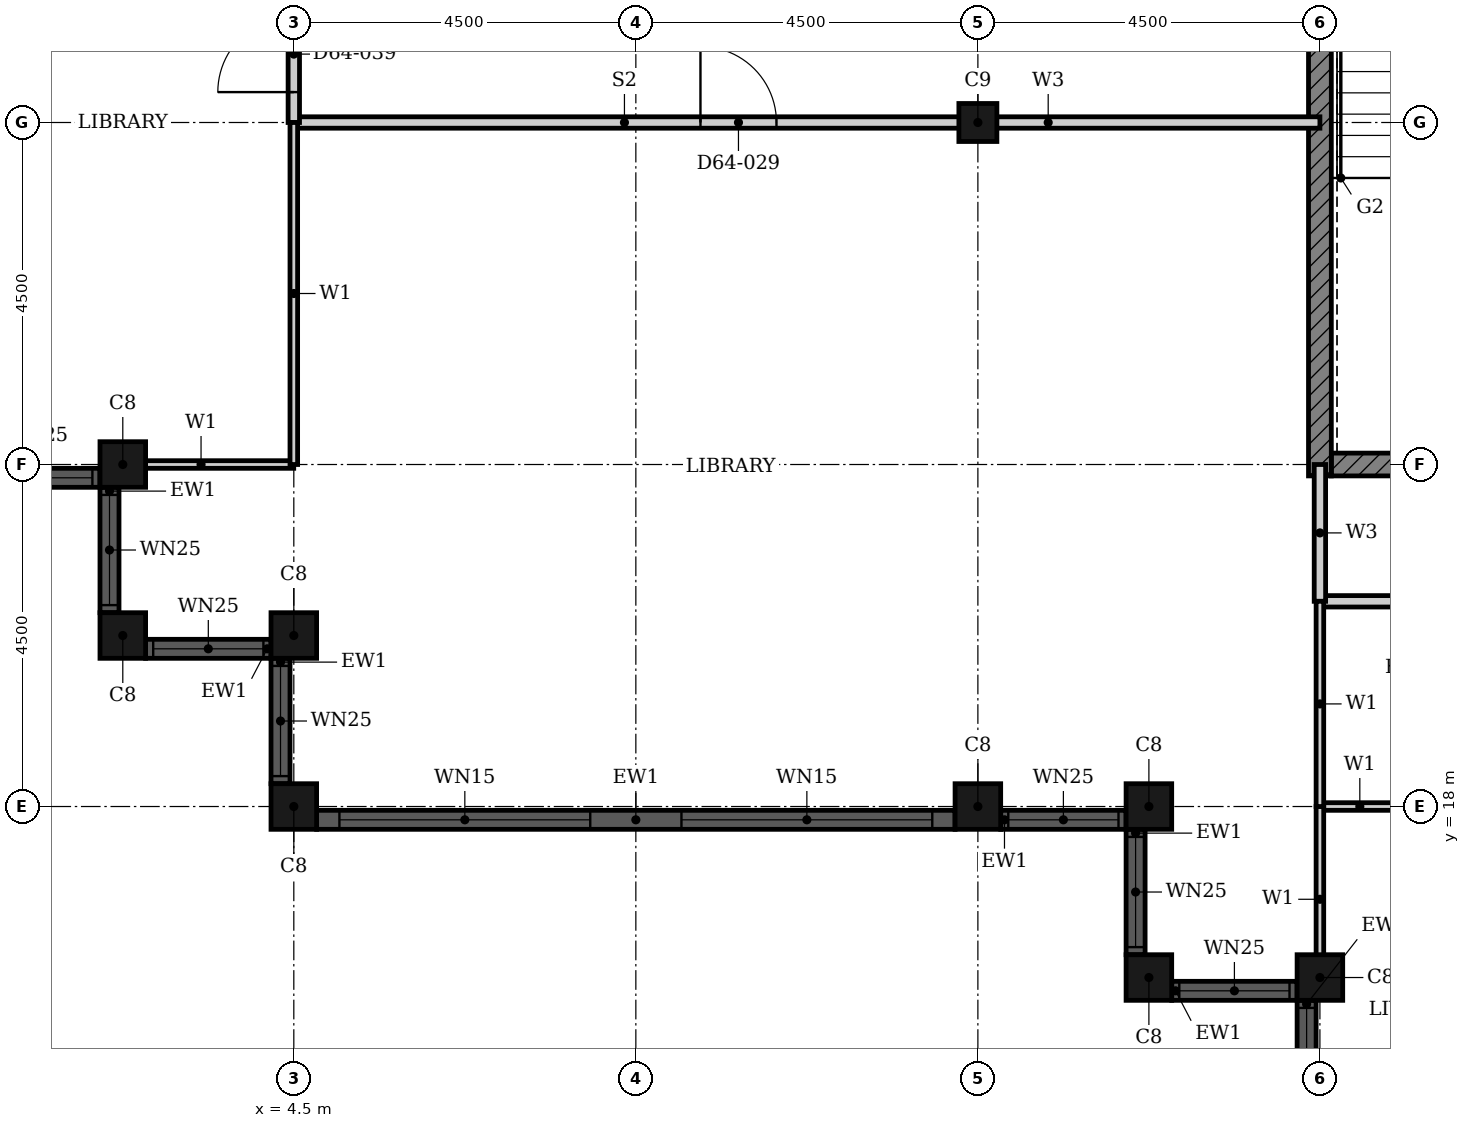
"""IFC4 building model, lengths in metres.
Left out: names, types, materials, properties, quantities, classifications, styles, units other than length and angle.
Written with IfcOpenShell. Run it as: python <this file> out.ifc"""

import sys

from ifc_helpers import new_model, si_unit, direction, frame, frame_2d, origin, origin_2d, place, context, subcontext, project, spatial, rectangle, hollow_rectangle, extrude, element, fill, save


model = new_model("IFC4")
c1 = context("Model", 3, precision=1e-05, world=origin(), true_north=direction((0.0, 1.0)))
c2 = subcontext(c1, "Body", "Model", "MODEL_VIEW")
j1 = project(units=[si_unit("LENGTHUNIT", "METRE"), si_unit("PLANEANGLEUNIT", "RADIAN")], contexts=[c1])
p1 = place(None, origin())
s1 = spatial("IfcSite", under=j1, at=p1, CompositionType="ELEMENT")
p2 = place(p1, origin())
s2 = spatial("IfcBuilding", under=s1, at=p2, CompositionType="ELEMENT")
p3 = place(p2, frame((0.0, 0.0, 252.7)))
s3 = spatial("IfcBuildingStorey", under=s2, at=p3, CompositionType="ELEMENT", Elevation=252.7)
for number, where, z_axis, x_axis in (
    (1, (15.75, 18.0, 0.0), (0.0, 0.0, 1.0), (1.0, 0.0, 0.0)),
    (2, (15.75, 15.75, 0.0), (0.0, 0.0, 1.0), (1.0, 0.0, 0.0)),
    (3, (18.0, 15.75, 0.0), (0.0, 0.0, 1.0), (1.0, 0.0, 0.0)),
    (4, (2.25, 22.5, 0.0), (0.0, 0.0, 1.0), (1.0, 0.0, 0.0)),
    (5, (2.25, 20.25, 0.0), (0.0, 0.0, 1.0), (1.0, 0.0, 0.0)),
    (6, (4.5, 20.25, 0.0), (0.0, 0.0, 1.0), (1.0, 0.0, 0.0)),
    (7, (4.5, 18.0, 0.0), (0.0, 0.0, 1.0), (1.0, 0.0, 0.0)),
    (8, (13.5, 18.0, 0.0), (0.0, 0.0, 1.0), (1.0, 0.0, 0.0)),
):
    element("IfcColumn", number, at=place(p3, frame(where, z_axis=z_axis, x_axis=x_axis)), inside=s3, PredefinedType="COLUMN", context=c2, shape_type="SweptSolid", body=[
        extrude(hollow_rectangle(XDim=0.6, YDim=0.6, WallThickness=0.02, at=origin_2d()), origin(), (0.0, 0.0, 1.0), 3.7),
    ])
p4 = place(p3, frame((13.5, 27.0, 0.0), z_axis=(0.0, 0.0, 1.0), x_axis=(1.0, 0.0, 0.0)))
e9 = element("IfcColumn", 9, at=p4, inside=s3, PredefinedType="COLUMN", context=c2, shape_type="SweptSolid", body=[
    extrude(hollow_rectangle(XDim=0.5, YDim=0.5, WallThickness=0.016, InnerFilletRadius=0.032, OuterFilletRadius=0.048, at=origin_2d()), origin(), (0.0, 0.0, 1.0), 3.7),
])
p5 = place(p3, frame((15.575, 17.7, 0.0), z_axis=(0.0, 0.0, 1.0), x_axis=(0.0, -1.0, 0.0)))
e10 = element("IfcWall", 10, at=p5, inside=s3, PredefinedType="SOLIDWALL", context=c2, shape_type="SweptSolid", body=[
    extrude(rectangle(XDim=1.65, YDim=0.25, at=frame_2d((0.825, 0.0))), origin(), (0.0, 0.0, 1.0), 3.7),
])
p6 = place(p5, frame((0.1, 0.0, 0.9)))
e11 = element("IfcOpeningElement", 11, at=p6, cuts=e10, PredefinedType="OPENING", context=c2, shape_type="SweptSolid", body=[
    extrude(rectangle(XDim=1.45, YDim=1.85, at=frame_2d((0.725, 0.925))), frame((0.0, 0.135, 0.0), z_axis=(0.0, -1.0, 0.0), x_axis=(1.0, 0.0, 0.0)), (0.0, 0.0, 1.0), 0.27),
])
p7 = place(p3, frame((16.05, 15.575, 0.0), z_axis=(0.0, 0.0, 1.0), x_axis=(1.0, 0.0, 0.0)))
e12 = element("IfcWall", 12, at=p7, inside=s3, PredefinedType="SOLIDWALL", context=c2, shape_type="SweptSolid", body=[
    extrude(rectangle(XDim=1.65, YDim=0.25, at=frame_2d((0.825, 0.0))), origin(), (0.0, 0.0, 1.0), 3.7),
])
p8 = place(p7, frame((0.1, 0.0, 0.9)))
e13 = element("IfcOpeningElement", 13, at=p8, cuts=e12, PredefinedType="OPENING", context=c2, shape_type="SweptSolid", body=[
    extrude(rectangle(XDim=1.45, YDim=1.85, at=frame_2d((0.725, 0.925))), frame((0.0, 0.135, 0.0), z_axis=(0.0, -1.0, 0.0), x_axis=(1.0, 0.0, 0.0)), (0.0, 0.0, 1.0), 0.27),
])
p9 = place(p3, frame((17.825, 15.45, 0.0), z_axis=(0.0, 0.0, 1.0), x_axis=(0.0, -1.0, 0.0)))
e14 = element("IfcWall", 14, at=p9, inside=s3, PredefinedType="SOLIDWALL", context=c2, shape_type="SweptSolid", body=[
    extrude(rectangle(XDim=1.65, YDim=0.25, at=frame_2d((0.825, 0.0))), origin(), (0.0, 0.0, 1.0), 3.7),
])
p10 = place(p9, frame((0.1, 0.0, 0.9)))
e15 = element("IfcOpeningElement", 15, at=p10, cuts=e14, PredefinedType="OPENING", context=c2, shape_type="SweptSolid", body=[
    extrude(rectangle(XDim=1.45, YDim=1.85, at=frame_2d((0.725, 0.925))), frame((0.0, 0.135, 0.0), z_axis=(0.0, -1.0, 0.0), x_axis=(1.0, 0.0, 0.0)), (0.0, 0.0, 1.0), 0.27),
])
p11 = place(p3, frame((0.3, 22.325, 0.0), z_axis=(0.0, 0.0, 1.0), x_axis=(1.0, 0.0, 0.0)))
e16 = element("IfcWall", 16, at=p11, inside=s3, PredefinedType="SOLIDWALL", context=c2, shape_type="SweptSolid", body=[
    extrude(rectangle(XDim=1.65, YDim=0.25, at=frame_2d((0.825, 0.0))), origin(), (0.0, 0.0, 1.0), 3.7),
])
p12 = place(p11, frame((0.1, 0.0, 0.9)))
e17 = element("IfcOpeningElement", 17, at=p12, cuts=e16, PredefinedType="OPENING", context=c2, shape_type="SweptSolid", body=[
    extrude(rectangle(XDim=1.45, YDim=1.85, at=frame_2d((0.725, 0.925))), frame((0.0, 0.135, 0.0), z_axis=(0.0, -1.0, 0.0), x_axis=(1.0, 0.0, 0.0)), (0.0, 0.0, 1.0), 0.27),
])
p13 = place(p3, frame((2.075, 22.2, 0.0), z_axis=(0.0, 0.0, 1.0), x_axis=(0.0, -1.0, 0.0)))
e18 = element("IfcWall", 18, at=p13, inside=s3, PredefinedType="SOLIDWALL", context=c2, shape_type="SweptSolid", body=[
    extrude(rectangle(XDim=1.65, YDim=0.25, at=frame_2d((0.825, 0.0))), origin(), (0.0, 0.0, 1.0), 3.7),
])
p14 = place(p13, frame((0.1, 0.0, 0.9)))
e19 = element("IfcOpeningElement", 19, at=p14, cuts=e18, PredefinedType="OPENING", context=c2, shape_type="SweptSolid", body=[
    extrude(rectangle(XDim=1.45, YDim=1.85, at=frame_2d((0.725, 0.925))), frame((0.0, 0.135, 0.0), z_axis=(0.0, -1.0, 0.0), x_axis=(1.0, 0.0, 0.0)), (0.0, 0.0, 1.0), 0.27),
])
p15 = place(p3, frame((2.55, 20.075, 0.0), z_axis=(0.0, 0.0, 1.0), x_axis=(1.0, 0.0, 0.0)))
e20 = element("IfcWall", 20, at=p15, inside=s3, PredefinedType="SOLIDWALL", context=c2, shape_type="SweptSolid", body=[
    extrude(rectangle(XDim=1.65, YDim=0.25, at=frame_2d((0.825, 0.0))), origin(), (0.0, 0.0, 1.0), 3.7),
])
p16 = place(p15, frame((0.1, 0.0, 0.9)))
e21 = element("IfcOpeningElement", 21, at=p16, cuts=e20, PredefinedType="OPENING", context=c2, shape_type="SweptSolid", body=[
    extrude(rectangle(XDim=1.45, YDim=1.85, at=frame_2d((0.725, 0.925))), frame((0.0, 0.135, 0.0), z_axis=(0.0, -1.0, 0.0), x_axis=(1.0, 0.0, 0.0)), (0.0, 0.0, 1.0), 0.27),
])
p17 = place(p3, frame((4.325, 19.95, 0.0), z_axis=(0.0, 0.0, 1.0), x_axis=(0.0, -1.0, 0.0)))
e22 = element("IfcWall", 22, at=p17, inside=s3, PredefinedType="SOLIDWALL", context=c2, shape_type="SweptSolid", body=[
    extrude(rectangle(XDim=1.65, YDim=0.25, at=frame_2d((0.825, 0.0))), origin(), (0.0, 0.0, 1.0), 3.7),
])
p18 = place(p17, frame((0.1, 0.0, 0.9)))
e23 = element("IfcOpeningElement", 23, at=p18, cuts=e22, PredefinedType="OPENING", context=c2, shape_type="SweptSolid", body=[
    extrude(rectangle(XDim=1.45, YDim=1.85, at=frame_2d((0.725, 0.925))), frame((0.0, 0.135, 0.0), z_axis=(0.0, -1.0, 0.0), x_axis=(1.0, 0.0, 0.0)), (0.0, 0.0, 1.0), 0.27),
])
p19 = place(p3, frame((4.8, 17.825, 0.0), z_axis=(0.0, 0.0, 1.0), x_axis=(1.0, 0.0, 0.0)))
e24 = element("IfcWall", 24, at=p19, inside=s3, PredefinedType="SOLIDWALL", context=c2, shape_type="SweptSolid", body=[
    extrude(rectangle(XDim=8.4, YDim=0.25, at=frame_2d((4.2, 0.0))), origin(), (0.0, 0.0, 1.0), 3.7),
])
p20 = place(p19, frame((0.3, 0.0, 0.45)))
e25 = element("IfcOpeningElement", 25, at=p20, cuts=e24, PredefinedType="OPENING", context=c2, shape_type="SweptSolid", body=[
    extrude(rectangle(XDim=3.3, YDim=2.3, at=frame_2d((1.65, 1.15))), frame((0.0, 0.135, 0.0), z_axis=(0.0, -1.0, 0.0), x_axis=(1.0, 0.0, 0.0)), (0.0, 0.0, 1.0), 0.27),
])
p21 = place(p19, frame((4.8, 0.0, 0.45)))
e26 = element("IfcOpeningElement", 26, at=p21, cuts=e24, PredefinedType="OPENING", context=c2, shape_type="SweptSolid", body=[
    extrude(rectangle(XDim=3.3, YDim=2.3, at=frame_2d((1.65, 1.15))), frame((0.0, 0.135, 0.0), z_axis=(0.0, -1.0, 0.0), x_axis=(1.0, 0.0, 0.0)), (0.0, 0.0, 1.0), 0.27),
])
p22 = place(p3, frame((13.8, 17.825, 0.0), z_axis=(0.0, 0.0, 1.0), x_axis=(1.0, 0.0, 0.0)))
e27 = element("IfcWall", 27, at=p22, inside=s3, PredefinedType="SOLIDWALL", context=c2, shape_type="SweptSolid", body=[
    extrude(rectangle(XDim=1.65, YDim=0.25, at=frame_2d((0.825, 0.0))), origin(), (0.0, 0.0, 1.0), 3.7),
])
p23 = place(p22, frame((0.1, 0.0, 0.9)))
e28 = element("IfcOpeningElement", 28, at=p23, cuts=e27, PredefinedType="OPENING", context=c2, shape_type="SweptSolid", body=[
    extrude(rectangle(XDim=1.45, YDim=1.85, at=frame_2d((0.725, 0.925))), frame((0.0, 0.135, 0.0), z_axis=(0.0, -1.0, 0.0), x_axis=(1.0, 0.0, 0.0)), (0.0, 0.0, 1.0), 0.27),
])
p24 = place(p3, frame((18.15, 22.5, 0.0), z_axis=(0.0, 0.0, 1.0), x_axis=(1.0, 0.0, 0.0)))
e29 = element("IfcWall", 29, at=p24, inside=s3, PredefinedType="SHEAR", context=c2, shape_type="SweptSolid", body=[
    extrude(rectangle(XDim=4.225, YDim=0.3, at=frame_2d((2.113, 0.0))), origin(), (0.0, 0.0, 1.0), 3.4),
])
p25 = place(p3, frame((18.0, 22.35, 0.0), z_axis=(0.0, 0.0, 1.0), x_axis=(0.0, 1.0, 0.0)))
e30 = element("IfcWall", 30, at=p25, inside=s3, PredefinedType="SHEAR", context=c2, shape_type="SweptSolid", body=[
    extrude(rectangle(XDim=9.3, YDim=0.3, at=frame_2d((4.65, 0.0))), origin(), (0.0, 0.0, 1.0), 3.4),
])
p26 = place(p3, frame((18.0, 20.7, 0.0), z_axis=(0.0, 0.0, 1.0), x_axis=(1.0, 0.0, 0.0)))
e31 = element("IfcWall", 31, at=p26, inside=s3, PredefinedType="PARTITIONING", context=c2, shape_type="SweptSolid", body=[
    extrude(rectangle(XDim=6.6, YDim=0.15, at=frame_2d((3.3, 0.0))), origin(), (0.0, 0.0, 1.0), 3.4),
])
p27 = place(p26, frame((4.3, 0.0, 0.0)))
e32 = element("IfcOpeningElement", 32, at=p27, cuts=e31, PredefinedType="OPENING", context=c2, shape_type="SweptSolid", body=[
    extrude(rectangle(XDim=1.0, YDim=2.2, at=frame_2d((0.5, 1.1))), frame((0.0, 0.085, 0.0), z_axis=(0.0, -1.0, 0.0), x_axis=(1.0, 0.0, 0.0)), (0.0, 0.0, 1.0), 0.17),
])
p28 = place(p3, frame((4.5, 27.0, 0.0), z_axis=(0.0, 0.0, 1.0), x_axis=(1.0, 0.0, 0.0)))
e33 = element("IfcWall", 33, at=p28, inside=s3, PredefinedType="PARTITIONING", context=c2, shape_type="SweptSolid", body=[
    extrude(rectangle(XDim=13.5, YDim=0.15, at=frame_2d((6.75, 0.0))), origin(), (0.0, 0.0, 1.0), 2.68),
])
p29 = place(p28, frame((5.35, 0.0, 0.0)))
e34 = element("IfcOpeningElement", 34, at=p29, cuts=e33, PredefinedType="OPENING", context=c2, shape_type="SweptSolid", body=[
    extrude(rectangle(XDim=1.0, YDim=2.1, at=frame_2d((0.5, 1.05))), frame((0.0, 0.085, 0.0), z_axis=(0.0, -1.0, 0.0), x_axis=(1.0, 0.0, 0.0)), (0.0, 0.0, 1.0), 0.17),
])
p30 = place(p3, frame((18.0, 20.7, 0.0), z_axis=(0.0, 0.0, 1.0), x_axis=(0.0, 1.0, 0.0)))
e35 = element("IfcWall", 35, at=p30, inside=s3, PredefinedType="PARTITIONING", context=c2, shape_type="SweptSolid", body=[
    extrude(rectangle(XDim=1.8, YDim=0.15, at=frame_2d((0.9, 0.0))), origin(), (0.0, 0.0, 1.0), 3.4),
])
p31 = place(p3, frame((4.5, 27.0, 0.0), z_axis=(0.0, 0.0, 1.0), x_axis=(0.0, 1.0, 0.0)))
e36 = element("IfcWall", 36, at=p31, inside=s3, PredefinedType="PARTITIONING", context=c2, shape_type="SweptSolid", body=[
    extrude(rectangle(XDim=1.8, YDim=0.15, at=frame_2d((0.9, 0.0))), origin(), (0.0, 0.0, 1.0), 3.4),
])
p32 = place(p31, frame((0.4, 0.0, 0.0)))
e37 = element("IfcOpeningElement", 37, at=p32, cuts=e36, PredefinedType="OPENING", context=c2, shape_type="SweptSolid", body=[
    extrude(rectangle(XDim=1.0, YDim=2.1, at=frame_2d((0.5, 1.05))), frame((0.0, 0.085, 0.0), z_axis=(0.0, -1.0, 0.0), x_axis=(1.0, 0.0, 0.0)), (0.0, 0.0, 1.0), 0.17),
])
p33 = place(p3, frame((18.0, 18.0, 0.0), z_axis=(0.0, 0.0, 1.0), x_axis=(1.0, 0.0, 0.0)))
e38 = element("IfcWall", 38, at=p33, inside=s3, PredefinedType="PARTITIONING", context=c2, shape_type="SweptSolid", body=[
    extrude(rectangle(XDim=3.0, YDim=0.1, at=frame_2d((1.5, 0.0))), origin(), (0.0, 0.0, 1.0), 3.4),
])
p34 = place(p33, frame((1.05, 0.0, 0.0)))
e39 = element("IfcOpeningElement", 39, at=p34, cuts=e38, PredefinedType="OPENING", context=c2, shape_type="SweptSolid", body=[
    extrude(rectangle(XDim=0.9, YDim=2.1, at=frame_2d((0.45, 1.05))), frame((0.0, 0.06, 0.0), z_axis=(0.0, -1.0, 0.0), x_axis=(1.0, 0.0, 0.0)), (0.0, 0.0, 1.0), 0.12),
])
p35 = place(p3, frame((2.06, 22.5, 0.0), z_axis=(0.0, 0.0, 1.0), x_axis=(1.0, 0.0, 0.0)))
e40 = element("IfcWall", 40, at=p35, inside=s3, PredefinedType="PARTITIONING", context=c2, shape_type="SweptSolid", body=[
    extrude(rectangle(XDim=2.439, YDim=0.1, at=frame_2d((1.219, 0.0))), origin(), (0.0, 0.0, 1.0), 2.68),
])
p36 = place(p3, frame((18.0, 15.56, 0.0), z_axis=(0.0, 0.0, 1.0), x_axis=(0.0, 1.0, 0.0)))
e41 = element("IfcWall", 41, at=p36, inside=s3, PredefinedType="PARTITIONING", context=c2, shape_type="SweptSolid", body=[
    extrude(rectangle(XDim=2.439, YDim=0.1, at=frame_2d((1.219, 0.0))), origin(), (0.0, 0.0, 1.0), 3.4),
])
p37 = place(p3, frame((18.0, 18.0, 0.0), z_axis=(0.0, 0.0, 1.0), x_axis=(0.0, 1.0, 0.0)))
e42 = element("IfcWall", 42, at=p37, inside=s3, PredefinedType="PARTITIONING", context=c2, shape_type="SweptSolid", body=[
    extrude(rectangle(XDim=2.7, YDim=0.1, at=frame_2d((1.35, 0.0))), origin(), (0.0, 0.0, 1.0), 3.4),
])
p38 = place(p3, frame((4.5, 22.5, 0.0), z_axis=(0.0, 0.0, 1.0), x_axis=(0.0, 1.0, 0.0)))
e43 = element("IfcWall", 43, at=p38, inside=s3, PredefinedType="PARTITIONING", context=c2, shape_type="SweptSolid", body=[
    extrude(rectangle(XDim=4.5, YDim=0.1, at=frame_2d((2.25, 0.0))), origin(), (0.0, 0.0, 1.0), 3.4),
])
p39 = place(p6, origin())
e44 = element("IfcWindow", 44, at=p39, inside=s3, PartitioningType="SINGLE_PANEL", PredefinedType="WINDOW", context=c2, shape_type="SweptSolid", body=[
    extrude(rectangle(XDim=1.45, YDim=1.85, at=frame_2d((0.725, 0.925))), frame((0.0, 0.03, 0.0), z_axis=(0.0, -1.0, 0.0), x_axis=(1.0, 0.0, 0.0)), (0.0, 0.0, 1.0), 0.06),
])
fill(e11, e44)
p40 = place(p8, origin())
e45 = element("IfcWindow", 45, at=p40, inside=s3, PartitioningType="SINGLE_PANEL", PredefinedType="WINDOW", context=c2, shape_type="SweptSolid", body=[
    extrude(rectangle(XDim=1.45, YDim=1.85, at=frame_2d((0.725, 0.925))), frame((0.0, 0.03, 0.0), z_axis=(0.0, -1.0, 0.0), x_axis=(1.0, 0.0, 0.0)), (0.0, 0.0, 1.0), 0.06),
])
fill(e13, e45)
p41 = place(p10, origin())
e46 = element("IfcWindow", 46, at=p41, inside=s3, PartitioningType="SINGLE_PANEL", PredefinedType="WINDOW", context=c2, shape_type="SweptSolid", body=[
    extrude(rectangle(XDim=1.45, YDim=1.85, at=frame_2d((0.725, 0.925))), frame((0.0, 0.03, 0.0), z_axis=(0.0, -1.0, 0.0), x_axis=(1.0, 0.0, 0.0)), (0.0, 0.0, 1.0), 0.06),
])
fill(e15, e46)
p42 = place(p12, origin())
e47 = element("IfcWindow", 47, at=p42, inside=s3, PartitioningType="SINGLE_PANEL", PredefinedType="WINDOW", context=c2, shape_type="SweptSolid", body=[
    extrude(rectangle(XDim=1.45, YDim=1.85, at=frame_2d((0.725, 0.925))), frame((0.0, 0.03, 0.0), z_axis=(0.0, -1.0, 0.0), x_axis=(1.0, 0.0, 0.0)), (0.0, 0.0, 1.0), 0.06),
])
fill(e17, e47)
p43 = place(p14, origin())
e48 = element("IfcWindow", 48, at=p43, inside=s3, PartitioningType="SINGLE_PANEL", PredefinedType="WINDOW", context=c2, shape_type="SweptSolid", body=[
    extrude(rectangle(XDim=1.45, YDim=1.85, at=frame_2d((0.725, 0.925))), frame((0.0, 0.03, 0.0), z_axis=(0.0, -1.0, 0.0), x_axis=(1.0, 0.0, 0.0)), (0.0, 0.0, 1.0), 0.06),
])
fill(e19, e48)
p44 = place(p16, origin())
e49 = element("IfcWindow", 49, at=p44, inside=s3, PartitioningType="SINGLE_PANEL", PredefinedType="WINDOW", context=c2, shape_type="SweptSolid", body=[
    extrude(rectangle(XDim=1.45, YDim=1.85, at=frame_2d((0.725, 0.925))), frame((0.0, 0.03, 0.0), z_axis=(0.0, -1.0, 0.0), x_axis=(1.0, 0.0, 0.0)), (0.0, 0.0, 1.0), 0.06),
])
fill(e21, e49)
p45 = place(p18, origin())
e50 = element("IfcWindow", 50, at=p45, inside=s3, PartitioningType="SINGLE_PANEL", PredefinedType="WINDOW", context=c2, shape_type="SweptSolid", body=[
    extrude(rectangle(XDim=1.45, YDim=1.85, at=frame_2d((0.725, 0.925))), frame((0.0, 0.03, 0.0), z_axis=(0.0, -1.0, 0.0), x_axis=(1.0, 0.0, 0.0)), (0.0, 0.0, 1.0), 0.06),
])
fill(e23, e50)
p46 = place(p20, origin())
e51 = element("IfcWindow", 51, at=p46, inside=s3, PartitioningType="SINGLE_PANEL", PredefinedType="WINDOW", context=c2, shape_type="SweptSolid", body=[
    extrude(rectangle(XDim=3.3, YDim=2.3, at=frame_2d((1.65, 1.15))), frame((0.0, 0.03, 0.0), z_axis=(0.0, -1.0, 0.0), x_axis=(1.0, 0.0, 0.0)), (0.0, 0.0, 1.0), 0.06),
])
fill(e25, e51)
p47 = place(p21, origin())
e52 = element("IfcWindow", 52, at=p47, inside=s3, PartitioningType="SINGLE_PANEL", PredefinedType="WINDOW", context=c2, shape_type="SweptSolid", body=[
    extrude(rectangle(XDim=3.3, YDim=2.3, at=frame_2d((1.65, 1.15))), frame((0.0, 0.03, 0.0), z_axis=(0.0, -1.0, 0.0), x_axis=(1.0, 0.0, 0.0)), (0.0, 0.0, 1.0), 0.06),
])
fill(e26, e52)
p48 = place(p23, origin())
e53 = element("IfcWindow", 53, at=p48, inside=s3, PartitioningType="SINGLE_PANEL", PredefinedType="WINDOW", context=c2, shape_type="SweptSolid", body=[
    extrude(rectangle(XDim=1.45, YDim=1.85, at=frame_2d((0.725, 0.925))), frame((0.0, 0.03, 0.0), z_axis=(0.0, -1.0, 0.0), x_axis=(1.0, 0.0, 0.0)), (0.0, 0.0, 1.0), 0.06),
])
fill(e28, e53)
p49 = place(p29, origin())
e54 = element("IfcDoor", 54, at=p49, inside=s3, OperationType="SINGLE_SWING_LEFT", PredefinedType="DOOR", context=c2, shape_type="SweptSolid", body=[
    extrude(rectangle(XDim=1.0, YDim=2.1, at=frame_2d((0.5, 1.05))), frame((0.0, 0.025, 0.0), z_axis=(0.0, -1.0, 0.0), x_axis=(1.0, 0.0, 0.0)), (0.0, 0.0, 1.0), 0.05),
])
fill(e34, e54)
p50 = place(p32, origin())
e55 = element("IfcDoor", 55, at=p50, inside=s3, OperationType="SINGLE_SWING_RIGHT", PredefinedType="DOOR", context=c2, shape_type="SweptSolid", body=[
    extrude(rectangle(XDim=1.0, YDim=2.1, at=frame_2d((0.5, 1.05))), frame((0.0, 0.025, 0.0), z_axis=(0.0, -1.0, 0.0), x_axis=(1.0, 0.0, 0.0)), (0.0, 0.0, 1.0), 0.05),
])
fill(e37, e55)
save(model, sys.argv[1])
